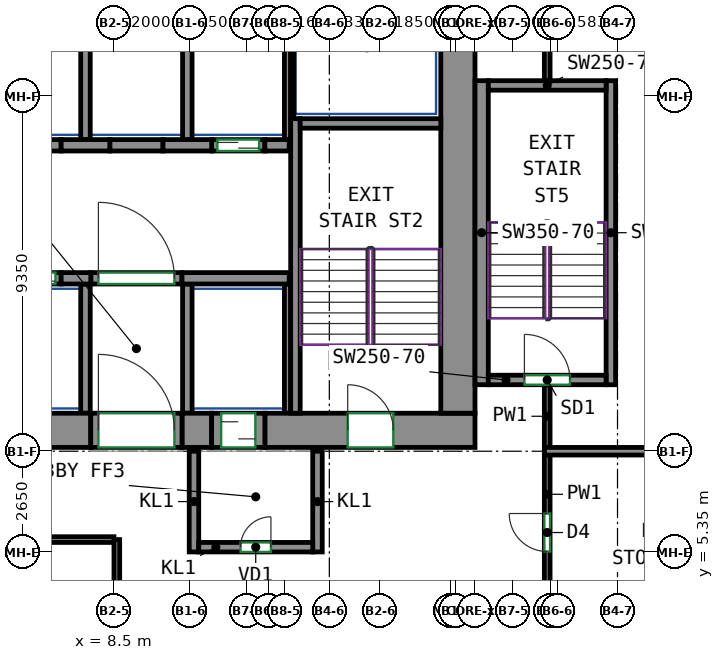
"""IFC4 building model, lengths in metres.
Left out: names, types, materials, properties, quantities, classifications, styles, units other than length and angle.
Written with IfcOpenShell. Run it as: python <this file> out.ifc"""

import sys

from ifc_helpers import new_model, si_unit, direction, frame, frame_2d, origin, place, context, subcontext, project, spatial, rectangle, extrude, source, transform, mapped, element, fill, save


model = new_model("IFC4")
c1 = context("Model", 3, precision=1e-05, world=origin(), true_north=direction((0.0, 1.0)))
c2 = subcontext(c1, "Body", "Model", "MODEL_VIEW")
j1 = project(units=[si_unit("LENGTHUNIT", "METRE"), si_unit("PLANEANGLEUNIT", "RADIAN")], contexts=[c1])
p1 = place(None, origin())
s1 = spatial("IfcSite", under=j1, at=p1, CompositionType="ELEMENT")
p2 = place(p1, origin())
s2 = spatial("IfcBuilding", under=s1, at=p2, CompositionType="ELEMENT")
p3 = place(p2, frame((0.0, 0.0, 143.9)))
s3 = spatial("IfcBuildingStorey", under=s2, at=p3, CompositionType="ELEMENT", Elevation=143.9)
m1 = source(origin(), c2, "Body", "SweptSolid", [
    extrude(rectangle(XDim=14.18, YDim=0.9, at=frame_2d((7.09, 0.0))), origin(), (0.0, 0.0, 1.0), 3.12),
])
p4 = place(p3, frame((-6.29, 8.55, 0.0), z_axis=(0.0, 0.0, 1.0), x_axis=(1.0, 0.0, 0.0)))
e1 = element("IfcWall", 1, at=p4, inside=s3, PredefinedType="SHEAR", context=c2, shape_type="MappedRepresentation", body=[
    mapped(m1, transform((0.0, 0.0, 0.0))),
])
m2 = source(origin(), c2, "Body", "SweptSolid", [
    extrude(rectangle(XDim=0.78, YDim=0.9, at=frame_2d((0.39, 0.0))), origin(), (0.0, 0.0, 1.0), 3.12),
])
p5 = place(p3, frame((10.29, 8.55, 0.0), z_axis=(0.0, 0.0, 1.0), x_axis=(1.0, 0.0, 0.0)))
e2 = element("IfcWall", 2, at=p5, inside=s3, PredefinedType="SHEAR", context=c2, shape_type="MappedRepresentation", body=[
    mapped(m2, transform((0.0, 0.0, 0.0))),
])
m3 = source(origin(), c2, "Body", "SweptSolid", [
    extrude(rectangle(XDim=5.53, YDim=0.9, at=frame_2d((2.765, 0.0))), origin(), (0.0, 0.0, 1.0), 3.12),
])
p6 = place(p3, frame((12.47, 8.55, 0.0), z_axis=(0.0, 0.0, 1.0), x_axis=(1.0, 0.0, 0.0)))
e3 = element("IfcWall", 3, at=p6, inside=s3, PredefinedType="SHEAR", context=c2, shape_type="MappedRepresentation", body=[
    mapped(m3, transform((0.0, 0.0, 0.0))),
])
p7 = place(p6, frame((2.18, 0.0, 0.0)))
e4 = element("IfcOpeningElement", 4, at=p7, cuts=e3, PredefinedType="OPENING", context=c2, shape_type="SweptSolid", body=[
    extrude(rectangle(XDim=1.2, YDim=2.1, at=frame_2d((0.6, 1.05))), frame((0.0, 0.46, 0.0), z_axis=(0.0, -1.0, 0.0), x_axis=(1.0, 0.0, 0.0)), (0.0, 0.0, 1.0), 0.92),
])
m4 = source(origin(), c2, "Body", "SweptSolid", [
    extrude(rectangle(XDim=12.0, YDim=0.9, at=frame_2d((6.0, 0.0))), origin(), (0.0, 0.0, 1.0), 3.12),
])
p8 = place(p3, frame((17.55, 9.0, 0.0), z_axis=(0.0, 0.0, 1.0), x_axis=(0.0, 1.0, 0.0)))
e5 = element("IfcWall", 5, at=p8, inside=s3, PredefinedType="SHEAR", context=c2, shape_type="MappedRepresentation", body=[
    mapped(m4, transform((0.0, 0.0, 0.0))),
])
m5 = source(origin(), c2, "Body", "SweptSolid", [
    extrude(rectangle(XDim=7.75, YDim=0.25, at=frame_2d((3.875, 0.0))), origin(), (0.0, 0.0, 1.0), 3.12),
])
p9 = place(p3, frame((13.275, 9.0, 0.0), z_axis=(0.0, 0.0, 1.0), x_axis=(0.0, 1.0, 0.0)))
e6 = element("IfcWall", 6, at=p9, inside=s3, PredefinedType="SHEAR", context=c2, shape_type="MappedRepresentation", body=[
    mapped(m5, transform((0.0, 0.0, 0.0))),
])
m6 = source(origin(), c2, "Body", "SweptSolid", [
    extrude(rectangle(XDim=3.7, YDim=0.25, at=frame_2d((1.85, 0.0))), origin(), (0.0, 0.0, 1.0), 3.12),
])
p10 = place(p3, frame((13.4, 16.625, 0.0), z_axis=(0.0, 0.0, 1.0), x_axis=(1.0, 0.0, 0.0)))
e7 = element("IfcWall", 7, at=p10, inside=s3, PredefinedType="SHEAR", context=c2, shape_type="MappedRepresentation", body=[
    mapped(m6, transform((0.0, 0.0, 0.0))),
])
m7 = source(origin(), c2, "Body", "SweptSolid", [
    extrude(rectangle(XDim=8.0, YDim=0.35, at=frame_2d((4.0, 0.0))), origin(), (0.0, 0.0, 1.0), 3.12),
])
p11 = place(p3, frame((18.175, 9.75, 0.0), z_axis=(0.0, 0.0, 1.0), x_axis=(0.0, 1.0, 0.0)))
e8 = element("IfcWall", 8, at=p11, inside=s3, PredefinedType="SHEAR", context=c2, shape_type="MappedRepresentation", body=[
    mapped(m7, transform((0.0, 0.0, 0.0))),
])
m8 = source(origin(), c2, "Body", "SweptSolid", [
    extrude(rectangle(XDim=8.0, YDim=0.25, at=frame_2d((4.0, 0.0))), origin(), (0.0, 0.0, 1.0), 3.12),
])
p12 = place(p3, frame((21.575, 9.75, 0.0), z_axis=(0.0, 0.0, 1.0), x_axis=(0.0, 1.0, 0.0)))
e9 = element("IfcWall", 9, at=p12, inside=s3, PredefinedType="SHEAR", context=c2, shape_type="MappedRepresentation", body=[
    mapped(m8, transform((0.0, 0.0, 0.0))),
])
m9 = source(origin(), c2, "Body", "SweptSolid", [
    extrude(rectangle(XDim=3.1, YDim=0.25, at=frame_2d((1.55, 0.0))), origin(), (0.0, 0.0, 1.0), 3.12),
])
p13 = place(p3, frame((18.35, 9.875, 0.0), z_axis=(0.0, 0.0, 1.0), x_axis=(1.0, 0.0, 0.0)))
e10 = element("IfcWall", 10, at=p13, inside=s3, PredefinedType="SHEAR", context=c2, shape_type="MappedRepresentation", body=[
    mapped(m9, transform((0.0, 0.0, 0.0))),
])
p14 = place(p13, frame((0.95, 0.0, 0.0)))
e11 = element("IfcOpeningElement", 11, at=p14, cuts=e10, PredefinedType="OPENING", context=c2, shape_type="SweptSolid", body=[
    extrude(rectangle(XDim=1.2, YDim=2.1, at=frame_2d((0.6, 1.05))), frame((0.0, 0.135, 0.0), z_axis=(0.0, -1.0, 0.0), x_axis=(1.0, 0.0, 0.0)), (0.0, 0.0, 1.0), 0.27),
])
p15 = place(p3, frame((18.35, 17.625, 0.0), z_axis=(0.0, 0.0, 1.0), x_axis=(1.0, 0.0, 0.0)))
e12 = element("IfcWall", 12, at=p15, inside=s3, PredefinedType="SHEAR", context=c2, shape_type="MappedRepresentation", body=[
    mapped(m9, transform((0.0, 0.0, 0.0))),
])
m10 = source(origin(), c2, "Body", "SweptSolid", [
    extrude(rectangle(XDim=0.78, YDim=0.3, at=frame_2d((0.39, 0.0))), origin(), (0.0, 0.0, 1.0), 3.12),
])
p16 = place(p3, frame((7.11, 12.55, 0.0), z_axis=(0.0, 0.0, 1.0), x_axis=(1.0, 0.0, 0.0)))
e13 = element("IfcWall", 13, at=p16, inside=s3, PredefinedType="SHEAR", context=c2, shape_type="MappedRepresentation", body=[
    mapped(m10, transform((0.0, 0.0, 0.0))),
])
m11 = source(origin(), c2, "Body", "SweptSolid", [
    extrude(rectangle(XDim=2.82, YDim=0.3, at=frame_2d((1.41, 0.0))), origin(), (0.0, 0.0, 1.0), 3.12),
])
p17 = place(p3, frame((10.29, 12.55, 0.0), z_axis=(0.0, 0.0, 1.0), x_axis=(1.0, 0.0, 0.0)))
e14 = element("IfcWall", 14, at=p17, inside=s3, PredefinedType="SHEAR", context=c2, shape_type="MappedRepresentation", body=[
    mapped(m11, transform((0.0, 0.0, 0.0))),
])
m12 = source(origin(), c2, "Body", "SweptSolid", [
    extrude(rectangle(XDim=1.28, YDim=0.3, at=frame_2d((0.64, 0.0))), origin(), (0.0, 0.0, 1.0), 3.12),
])
p18 = place(p3, frame((7.11, 16.05, 0.0), z_axis=(0.0, 0.0, 1.0), x_axis=(1.0, 0.0, 0.0)))
e15 = element("IfcWall", 15, at=p18, inside=s3, PredefinedType="SHEAR", context=c2, shape_type="MappedRepresentation", body=[
    mapped(m12, transform((0.0, 0.0, 0.0))),
])
m13 = source(origin(), c2, "Body", "SweptSolid", [
    extrude(rectangle(XDim=1.28, YDim=0.3, at=frame_2d((0.64, 0.0))), origin(), (0.0, 0.0, 1.0), 3.12),
])
p19 = place(p3, frame((9.79, 16.05, 0.0), z_axis=(0.0, 0.0, 1.0), x_axis=(1.0, 0.0, 0.0)))
e16 = element("IfcWall", 16, at=p19, inside=s3, PredefinedType="SHEAR", context=c2, shape_type="MappedRepresentation", body=[
    mapped(m13, transform((0.0, 0.0, 0.0))),
])
m14 = source(origin(), c2, "Body", "SweptSolid", [
    extrude(rectangle(XDim=0.64, YDim=0.3, at=frame_2d((0.32, 0.0))), origin(), (0.0, 0.0, 1.0), 3.12),
])
p20 = place(p3, frame((12.47, 16.05, 0.0), z_axis=(0.0, 0.0, 1.0), x_axis=(1.0, 0.0, 0.0)))
e17 = element("IfcWall", 17, at=p20, inside=s3, PredefinedType="SHEAR", context=c2, shape_type="MappedRepresentation", body=[
    mapped(m14, transform((0.0, 0.0, 0.0))),
])
m15 = source(origin(), c2, "Body", "SweptSolid", [
    extrude(rectangle(XDim=1.4, YDim=0.3, at=frame_2d((0.7, 0.0))), origin(), (0.0, 0.0, 1.0), 3.12),
])
p21 = place(p3, frame((5.71, 12.55, 0.0), z_axis=(0.0, 0.0, 1.0), x_axis=(1.0, 0.0, 0.0)))
e18 = element("IfcWall", 18, at=p21, inside=s3, PredefinedType="PARTITIONING", context=c2, shape_type="MappedRepresentation", body=[
    mapped(m15, transform((0.0, 0.0, 0.0))),
])
p22 = place(p21, frame((0.15, 0.0, 0.0)))
e19 = element("IfcOpeningElement", 19, at=p22, cuts=e18, PredefinedType="OPENING", context=c2, shape_type="SweptSolid", body=[
    extrude(rectangle(XDim=1.1, YDim=2.1, at=frame_2d((0.55, 1.05))), frame((0.0, 0.16, 0.0), z_axis=(0.0, -1.0, 0.0), x_axis=(1.0, 0.0, 0.0)), (0.0, 0.0, 1.0), 0.32),
])
m16 = source(origin(), c2, "Body", "SweptSolid", [
    extrude(rectangle(XDim=1.4, YDim=0.3, at=frame_2d((0.7, 0.0))), origin(), (0.0, 0.0, 1.0), 3.12),
])
p23 = place(p3, frame((11.07, 16.05, 0.0), z_axis=(0.0, 0.0, 1.0), x_axis=(1.0, 0.0, 0.0)))
e20 = element("IfcWall", 20, at=p23, inside=s3, PredefinedType="PARTITIONING", context=c2, shape_type="MappedRepresentation", body=[
    mapped(m16, transform((0.0, 0.0, 0.0))),
])
p24 = place(p23, frame((0.15, 0.0, 0.0)))
e21 = element("IfcOpeningElement", 21, at=p24, cuts=e20, PredefinedType="OPENING", context=c2, shape_type="SweptSolid", body=[
    extrude(rectangle(XDim=1.1, YDim=2.1, at=frame_2d((0.55, 1.05))), frame((0.0, 0.16, 0.0), z_axis=(0.0, -1.0, 0.0), x_axis=(1.0, 0.0, 0.0)), (0.0, 0.0, 1.0), 0.32),
])
m17 = source(origin(), c2, "Body", "SweptSolid", [
    extrude(rectangle(XDim=2.4, YDim=0.3, at=frame_2d((1.2, 0.0))), origin(), (0.0, 0.0, 1.0), 3.12),
])
p25 = place(p3, frame((7.89, 12.55, 0.0), z_axis=(0.0, 0.0, 1.0), x_axis=(1.0, 0.0, 0.0)))
e22 = element("IfcWall", 22, at=p25, inside=s3, PredefinedType="PARTITIONING", context=c2, shape_type="MappedRepresentation", body=[
    mapped(m17, transform((0.0, 0.0, 0.0))),
])
p26 = place(p25, frame((0.2, 0.0, 0.0)))
e23 = element("IfcOpeningElement", 23, at=p26, cuts=e22, PredefinedType="OPENING", context=c2, shape_type="SweptSolid", body=[
    extrude(rectangle(XDim=2.0, YDim=2.1, at=frame_2d((1.0, 1.05))), frame((0.0, 0.16, 0.0), z_axis=(0.0, -1.0, 0.0), x_axis=(1.0, 0.0, 0.0)), (0.0, 0.0, 1.0), 0.32),
])
for number, where, z_axis, x_axis in (
    (24, (5.71, 16.05, 0.0), (0.0, 0.0, 1.0), (1.0, 0.0, 0.0)),
    (25, (8.39, 16.05, 0.0), (0.0, 0.0, 1.0), (1.0, 0.0, 0.0)),
):
    element("IfcWall", number, at=place(p3, frame(where, z_axis=z_axis, x_axis=x_axis)), inside=s3, PredefinedType="PARTITIONING", context=c2, shape_type="MappedRepresentation", body=[
        mapped(m15, transform((0.0, 0.0, 0.0))),
    ])
m18 = source(origin(), c2, "Body", "SweptSolid", [
    extrude(rectangle(XDim=2.65, YDim=0.25, at=frame_2d((1.325, 0.0))), origin(), (0.0, 0.0, 1.0), 3.12),
])
for number, where, z_axis, x_axis in (
    (26, (10.605, 5.35, 0.0), (0.0, 0.0, 1.0), (0.0, 1.0, 0.0)),
    (27, (13.855, 5.35, 0.0), (0.0, 0.0, 1.0), (0.0, 1.0, 0.0)),
):
    element("IfcWall", number, at=place(p3, frame(where, z_axis=z_axis, x_axis=x_axis)), inside=s3, PredefinedType="PARTITIONING", context=c2, shape_type="MappedRepresentation", body=[
        mapped(m18, transform((0.0, 0.0, 0.0))),
    ])
m19 = source(origin(), c2, "Body", "SweptSolid", [
    extrude(rectangle(XDim=3.0, YDim=0.25, at=frame_2d((1.5, 0.0))), origin(), (0.0, 0.0, 1.0), 3.12),
])
p27 = place(p3, frame((10.73, 5.475, 0.0), z_axis=(0.0, 0.0, 1.0), x_axis=(1.0, 0.0, 0.0)))
e28 = element("IfcWall", 28, at=p27, inside=s3, PredefinedType="PARTITIONING", context=c2, shape_type="MappedRepresentation", body=[
    mapped(m19, transform((0.0, 0.0, 0.0))),
])
p28 = place(p27, frame((1.1, 0.0, 0.0)))
e29 = element("IfcOpeningElement", 29, at=p28, cuts=e28, PredefinedType="OPENING", context=c2, shape_type="SweptSolid", body=[
    extrude(rectangle(XDim=0.8, YDim=2.0, at=frame_2d((0.4, 1.0))), frame((0.0, 0.135, 0.0), z_axis=(0.0, -1.0, 0.0), x_axis=(1.0, 0.0, 0.0)), (0.0, 0.0, 1.0), 0.27),
])
m20 = source(origin(), c2, "Body", "SweptSolid", [
    extrude(rectangle(XDim=3.275, YDim=0.165, at=frame_2d((1.638, 0.0))), origin(), (0.0, 0.0, 1.0), 3.12),
])
p29 = place(p3, frame((13.067, 16.2, 0.0), z_axis=(0.0, 0.0, 1.0), x_axis=(0.0, 1.0, 0.0)))
e30 = element("IfcWall", 30, at=p29, inside=s3, PredefinedType="PARTITIONING", context=c2, shape_type="MappedRepresentation", body=[
    mapped(m20, transform((0.0, 0.0, 0.0))),
])
m21 = source(origin(), c2, "Body", "SweptSolid", [
    extrude(rectangle(XDim=3.275, YDim=0.25, at=frame_2d((1.638, 0.0))), origin(), (0.0, 0.0, 1.0), 3.12),
])
p30 = place(p3, frame((10.43, 16.2, 0.0), z_axis=(0.0, 0.0, 1.0), x_axis=(0.0, 1.0, 0.0)))
e31 = element("IfcWall", 31, at=p30, inside=s3, PredefinedType="PARTITIONING", context=c2, shape_type="MappedRepresentation", body=[
    mapped(m21, transform((0.0, 0.0, 0.0))),
])
m22 = source(origin(), c2, "Body", "SweptSolid", [
    extrude(rectangle(XDim=2.725, YDim=0.085, at=frame_2d((1.363, 0.0))), origin(), (0.0, 0.0, 1.0), 3.12),
])
p31 = place(p3, frame((13.192, 16.75, 0.0), z_axis=(0.0, 0.0, 1.0), x_axis=(0.0, 1.0, 0.0)))
e32 = element("IfcWall", 32, at=p31, inside=s3, PredefinedType="PARTITIONING", context=c2, shape_type="MappedRepresentation", body=[
    mapped(m22, transform((0.0, 0.0, 0.0))),
])
p32 = place(p3, frame((7.75, 16.2, 0.0), z_axis=(0.0, 0.0, 1.0), x_axis=(0.0, 1.0, 0.0)))
e33 = element("IfcWall", 33, at=p32, inside=s3, PredefinedType="PARTITIONING", context=c2, shape_type="MappedRepresentation", body=[
    mapped(m21, transform((0.0, 0.0, 0.0))),
])
m23 = source(origin(), c2, "Body", "SweptSolid", [
    extrude(rectangle(XDim=3.4, YDim=0.25, at=frame_2d((1.7, 0.0))), origin(), (0.0, 0.0, 1.0), 3.12),
])
p33 = place(p3, frame((10.43, 9.0, 0.0), z_axis=(0.0, 0.0, 1.0), x_axis=(0.0, 1.0, 0.0)))
e34 = element("IfcWall", 34, at=p33, inside=s3, PredefinedType="PARTITIONING", context=c2, shape_type="MappedRepresentation", body=[
    mapped(m23, transform((0.0, 0.0, 0.0))),
])
m24 = source(origin(), c2, "Body", "SweptSolid", [
    extrude(rectangle(XDim=3.4, YDim=0.165, at=frame_2d((1.7, 0.0))), origin(), (0.0, 0.0, 1.0), 3.12),
])
p34 = place(p3, frame((13.067, 9.0, 0.0), z_axis=(0.0, 0.0, 1.0), x_axis=(0.0, 1.0, 0.0)))
e35 = element("IfcWall", 35, at=p34, inside=s3, PredefinedType="PARTITIONING", context=c2, shape_type="MappedRepresentation", body=[
    mapped(m24, transform((0.0, 0.0, 0.0))),
])
p35 = place(p3, frame((7.75, 9.0, 0.0), z_axis=(0.0, 0.0, 1.0), x_axis=(0.0, 1.0, 0.0)))
e36 = element("IfcWall", 36, at=p35, inside=s3, PredefinedType="PARTITIONING", context=c2, shape_type="MappedRepresentation", body=[
    mapped(m23, transform((0.0, 0.0, 0.0))),
])
m25 = source(origin(), c2, "Body", "SweptSolid", [
    extrude(rectangle(XDim=2.4, YDim=0.9, at=frame_2d((1.2, 0.0))), origin(), (0.0, 0.0, 1.0), 2.7),
])
p36 = place(p3, frame((7.89, 8.55, 0.0), z_axis=(0.0, 0.0, 1.0), x_axis=(1.0, 0.0, 0.0)))
e37 = element("IfcWall", 37, at=p36, inside=s3, PredefinedType="PARTITIONING", context=c2, shape_type="MappedRepresentation", body=[
    mapped(m25, transform((0.0, 0.0, 0.0))),
])
p37 = place(p36, frame((0.2, 0.0, 0.0)))
e38 = element("IfcOpeningElement", 38, at=p37, cuts=e37, PredefinedType="OPENING", context=c2, shape_type="SweptSolid", body=[
    extrude(rectangle(XDim=2.0, YDim=2.1, at=frame_2d((1.0, 1.05))), frame((0.0, 0.46, 0.0), z_axis=(0.0, -1.0, 0.0), x_axis=(1.0, 0.0, 0.0)), (0.0, 0.0, 1.0), 0.92),
])
m26 = source(origin(), c2, "Body", "SweptSolid", [
    extrude(rectangle(XDim=1.4, YDim=0.9, at=frame_2d((0.7, 0.0))), origin(), (0.0, 0.0, 1.0), 2.7),
])
p38 = place(p3, frame((11.07, 8.55, 0.0), z_axis=(0.0, 0.0, 1.0), x_axis=(1.0, 0.0, 0.0)))
e39 = element("IfcWall", 39, at=p38, inside=s3, PredefinedType="PARTITIONING", context=c2, shape_type="MappedRepresentation", body=[
    mapped(m26, transform((0.0, 0.0, 0.0))),
])
p39 = place(p38, frame((0.25, 0.0, 0.0)))
e40 = element("IfcOpeningElement", 40, at=p39, cuts=e39, PredefinedType="OPENING", context=c2, shape_type="SweptSolid", body=[
    extrude(rectangle(XDim=0.9, YDim=2.1, at=frame_2d((0.45, 1.05))), frame((0.0, 0.46, 0.0), z_axis=(0.0, -1.0, 0.0), x_axis=(1.0, 0.0, 0.0)), (0.0, 0.0, 1.0), 0.92),
])
p40 = place(p3, frame((19.9, 4.434, 0.0), z_axis=(0.0, 0.0, 1.0), x_axis=(0.0, 1.0, 0.0)))
e41 = element("IfcWall", 41, at=p40, inside=s3, PredefinedType="PARTITIONING", context=c2, shape_type="SweptSolid", body=[
    extrude(rectangle(XDim=3.476, YDim=0.15, at=frame_2d((1.738, 0.0))), origin(), (0.0, 0.0, 1.0), 3.12),
])
p41 = place(p40, frame((0.927, 0.0, 0.0)))
e42 = element("IfcOpeningElement", 42, at=p41, cuts=e41, PredefinedType="OPENING", context=c2, shape_type="SweptSolid", body=[
    extrude(rectangle(XDim=1.0, YDim=2.1, at=frame_2d((0.5, 1.05))), frame((0.0, 0.085, 0.0), z_axis=(0.0, -1.0, 0.0), x_axis=(1.0, 0.0, 0.0)), (0.0, 0.0, 1.0), 0.17),
])
p42 = place(p3, frame((19.9, 17.75, 0.0), z_axis=(0.0, 0.0, 1.0), x_axis=(0.0, 1.0, 0.0)))
e43 = element("IfcWall", 43, at=p42, inside=s3, PredefinedType="PARTITIONING", context=c2, shape_type="SweptSolid", body=[
    extrude(rectangle(XDim=4.175, YDim=0.15, at=frame_2d((2.087, 0.0))), origin(), (0.0, 0.0, 1.0), 3.12),
])
p43 = place(p42, frame((1.227, 0.0, 0.0)))
e44 = element("IfcOpeningElement", 44, at=p43, cuts=e43, PredefinedType="OPENING", context=c2, shape_type="SweptSolid", body=[
    extrude(rectangle(XDim=0.9, YDim=2.1, at=frame_2d((0.45, 1.05))), frame((0.0, 0.085, 0.0), z_axis=(0.0, -1.0, 0.0), x_axis=(1.0, 0.0, 0.0)), (0.0, 0.0, 1.0), 0.17),
])
p44 = place(p3, frame((19.9, 8.09, 0.0), z_axis=(0.0, 0.0, 1.0), x_axis=(0.0, 1.0, 0.0)))
e45 = element("IfcWall", 45, at=p44, inside=s3, PredefinedType="PARTITIONING", context=c2, shape_type="SweptSolid", body=[
    extrude(rectangle(XDim=1.66, YDim=0.15, at=frame_2d((0.83, 0.0))), origin(), (0.0, 0.0, 1.0), 3.12),
])
p45 = place(p3, frame((19.827, 8.0, 0.0), z_axis=(0.0, 0.0, 1.0), x_axis=(1.0, 0.0, 0.0)))
e46 = element("IfcWall", 46, at=p45, inside=s3, PredefinedType="PARTITIONING", context=c2, shape_type="SweptSolid", body=[
    extrude(rectangle(XDim=4.573, YDim=0.2, at=frame_2d((2.287, 0.0))), origin(), (0.0, 0.0, 1.0), 3.12),
])
p46 = place(p3, frame((-6.575, 5.675, 0.0), z_axis=(0.0, 0.0, 1.0), x_axis=(1.0, 0.0, 0.0)))
e47 = element("IfcWall", 47, at=p46, inside=s3, PredefinedType="PARTITIONING", context=c2, shape_type="SweptSolid", body=[
    extrude(rectangle(XDim=15.075, YDim=0.15, at=frame_2d((7.538, 0.0))), origin(), (0.0, 0.0, 1.0), 3.12),
])
p47 = place(p3, frame((8.575, 5.675, 0.0), z_axis=(0.0, 0.0, 1.0), x_axis=(0.0, -1.0, 0.0)))
e48 = element("IfcWall", 48, at=p47, inside=s3, PredefinedType="PARTITIONING", context=c2, shape_type="SweptSolid", body=[
    extrude(rectangle(XDim=15.15, YDim=0.15, at=frame_2d((7.575, 0.0))), origin(), (0.0, 0.0, 1.0), 3.12),
])
p48 = place(p26, origin())
e49 = element("IfcDoor", 49, at=p48, inside=s3, OperationType="DOUBLE_DOOR_SINGLE_SWING", PredefinedType="DOOR", context=c2, shape_type="SweptSolid", body=[
    extrude(rectangle(XDim=2.0, YDim=2.1, at=frame_2d((1.0, 1.05))), frame((0.0, 0.025, 0.0), z_axis=(0.0, -1.0, 0.0), x_axis=(1.0, 0.0, 0.0)), (0.0, 0.0, 1.0), 0.05),
])
fill(e23, e49)
p49 = place(p37, origin())
e50 = element("IfcDoor", 50, at=p49, inside=s3, OperationType="DOUBLE_DOOR_SINGLE_SWING", PredefinedType="DOOR", context=c2, shape_type="SweptSolid", body=[
    extrude(rectangle(XDim=2.0, YDim=2.1, at=frame_2d((1.0, 1.05))), frame((0.0, 0.355, 0.0), z_axis=(0.0, -1.0, 0.0), x_axis=(1.0, 0.0, 0.0)), (0.0, 0.0, 1.0), 0.05),
])
fill(e38, e50)
p50 = place(p28, origin())
e51 = element("IfcDoor", 51, at=p50, inside=s3, OperationType="SINGLE_SWING_RIGHT", PredefinedType="DOOR", context=c2, shape_type="SweptSolid", body=[
    extrude(rectangle(XDim=0.8, YDim=2.0, at=frame_2d((0.4, 1.0))), frame((0.0, 0.025, 0.0), z_axis=(0.0, -1.0, 0.0), x_axis=(1.0, 0.0, 0.0)), (0.0, 0.0, 1.0), 0.05),
])
fill(e29, e51)
p51 = place(p39, origin())
e52 = element("IfcDoor", 52, at=p51, inside=s3, OperationType="SLIDING_TO_LEFT", PredefinedType="DOOR", context=c2, shape_type="SweptSolid", body=[
    extrude(rectangle(XDim=0.9, YDim=2.1, at=frame_2d((0.45, 1.05))), frame((0.0, 0.355, 0.0), z_axis=(0.0, -1.0, 0.0), x_axis=(1.0, 0.0, 0.0)), (0.0, 0.0, 1.0), 0.05),
])
fill(e40, e52)
p52 = place(p22, origin())
e53 = element("IfcDoor", 53, at=p52, inside=s3, OperationType="DOUBLE_DOOR_SLIDING", PredefinedType="DOOR", context=c2, shape_type="SweptSolid", body=[
    extrude(rectangle(XDim=1.1, YDim=2.1, at=frame_2d((0.55, 1.05))), frame((0.0, 0.025, 0.0), z_axis=(0.0, -1.0, 0.0), x_axis=(1.0, 0.0, 0.0)), (0.0, 0.0, 1.0), 0.05),
])
fill(e19, e53)
p53 = place(p24, origin())
e54 = element("IfcDoor", 54, at=p53, inside=s3, OperationType="DOUBLE_DOOR_SLIDING", PredefinedType="DOOR", context=c2, shape_type="SweptSolid", body=[
    extrude(rectangle(XDim=1.1, YDim=2.1, at=frame_2d((0.55, 1.05))), frame((0.0, 0.025, 0.0), z_axis=(0.0, -1.0, 0.0), x_axis=(1.0, 0.0, 0.0)), (0.0, 0.0, 1.0), 0.05),
])
fill(e21, e54)
p54 = place(p7, origin())
e55 = element("IfcDoor", 55, at=p54, inside=s3, OperationType="DOUBLE_DOOR_SINGLE_SWING", PredefinedType="DOOR", context=c2, shape_type="SweptSolid", body=[
    extrude(rectangle(XDim=1.2, YDim=2.1, at=frame_2d((0.6, 1.05))), frame((0.0, 0.355, 0.0), z_axis=(0.0, -1.0, 0.0), x_axis=(1.0, 0.0, 0.0)), (0.0, 0.0, 1.0), 0.05),
])
fill(e4, e55)
p55 = place(p14, origin())
e56 = element("IfcDoor", 56, at=p55, inside=s3, OperationType="DOUBLE_DOOR_SINGLE_SWING", PredefinedType="DOOR", context=c2, shape_type="SweptSolid", body=[
    extrude(rectangle(XDim=1.2, YDim=2.1, at=frame_2d((0.6, 1.05))), frame((0.0, 0.025, 0.0), z_axis=(0.0, -1.0, 0.0), x_axis=(1.0, 0.0, 0.0)), (0.0, 0.0, 1.0), 0.05),
])
fill(e11, e56)
p56 = place(p41, origin())
e57 = element("IfcDoor", 57, at=p56, inside=s3, OperationType="SINGLE_SWING_RIGHT", PredefinedType="DOOR", context=c2, shape_type="SweptSolid", body=[
    extrude(rectangle(XDim=1.0, YDim=2.1, at=frame_2d((0.5, 1.05))), frame((0.0, 0.025, 0.0), z_axis=(0.0, -1.0, 0.0), x_axis=(1.0, 0.0, 0.0)), (0.0, 0.0, 1.0), 0.05),
])
fill(e42, e57)
save(model, sys.argv[1])
